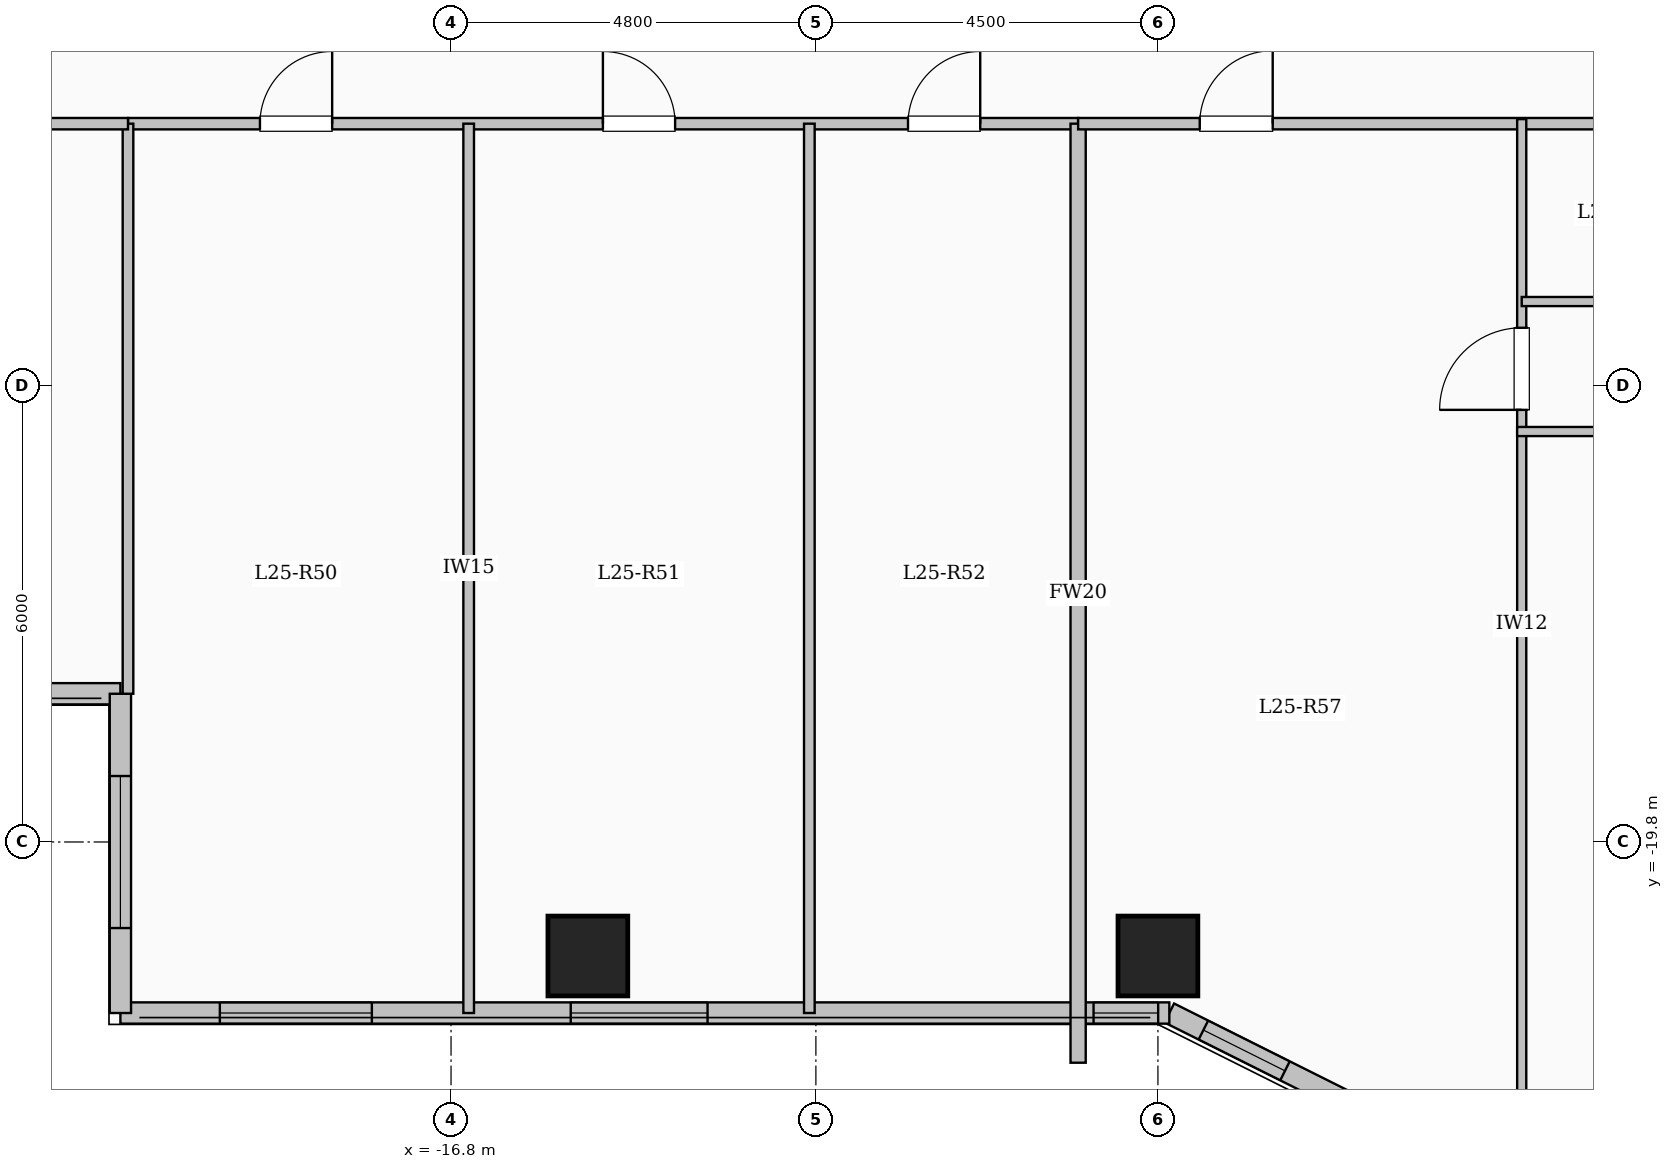
"""IFC4 building model, lengths in metres.
Left out: names, types, materials, properties, quantities, classifications, styles, units other than length and angle.
Written with IfcOpenShell. Run it as: python <this file> out.ifc"""

import sys

from ifc_helpers import new_model, si_unit, direction, frame, frame_2d, origin, origin_2d, place, context, subcontext, project, spatial, rectangle, extrude, element, fill, save


model = new_model("IFC4")
c1 = context("Model", 3, precision=1e-05, world=origin(), true_north=direction((0.0, 1.0)))
c2 = subcontext(c1, "Body", "Model", "MODEL_VIEW")
j1 = project(units=[si_unit("LENGTHUNIT", "METRE"), si_unit("PLANEANGLEUNIT", "RADIAN")], contexts=[c1])
p1 = place(None, origin())
s1 = spatial("IfcSite", under=j1, at=p1, CompositionType="ELEMENT")
p2 = place(p1, origin())
s2 = spatial("IfcBuilding", under=s1, at=p2, CompositionType="ELEMENT")
p3 = place(p2, frame((0.0, 0.0, 95.05)))
s3 = spatial("IfcBuildingStorey", under=s2, at=p3, CompositionType="ELEMENT", Elevation=95.05)
for number, where, z_axis, x_axis in (
    (1, (-15.0, -21.3, 0.0), (0.0, 0.0, 1.0), (1.0, 0.0, 0.0)),
    (2, (-7.5, -21.3, 0.0), (0.0, 0.0, 1.0), (1.0, 0.0, 0.0)),
):
    element("IfcColumn", number, at=place(p3, frame(where, z_axis=z_axis, x_axis=x_axis)), inside=s3, PredefinedType="COLUMN", context=c2, shape_type="SweptSolid", body=[
        extrude(rectangle(XDim=1.05, YDim=1.05, at=origin_2d()), origin(), (0.0, 0.0, 1.0), 3.35),
    ])
p4 = place(p3, frame((-21.15, -17.85, 0.0), z_axis=(0.0, 0.0, 1.0), x_axis=(-1.0, 0.0, 0.0)))
e3 = element("IfcWall", 3, at=p4, inside=s3, PredefinedType="SOLIDWALL", context=c2, shape_type="SweptSolid", body=[
    extrude(rectangle(XDim=5.7, YDim=0.28, at=frame_2d((2.85, 0.0))), origin(), (0.0, 0.0, 1.0), 3.1),
])
p5 = place(p4, frame((1.625, 0.0, 0.9)))
e4 = element("IfcOpeningElement", 4, at=p5, cuts=e3, PredefinedType="OPENING", context=c2, shape_type="SweptSolid", body=[
    extrude(rectangle(XDim=2.4, YDim=1.8, at=frame_2d((1.2, 0.9))), frame((0.0, 0.15, 0.0), z_axis=(0.0, -1.0, 0.0), x_axis=(1.0, 0.0, 0.0)), (0.0, 0.0, 1.0), 0.3),
])
p6 = place(p3, frame((-4.35, -23.55, 0.0), z_axis=(0.0, 0.0, 1.0), x_axis=(-0.894427191, 0.4472135955, 0.0)))
e5 = element("IfcWall", 5, at=p6, inside=s3, PredefinedType="SOLIDWALL", context=c2, shape_type="SweptSolid", body=[
    extrude(rectangle(XDim=3.354, YDim=0.28, at=frame_2d((1.677, 0.0))), origin(), (0.0, 0.0, 1.0), 3.1),
])
p7 = place(p6, frame((1.653, 0.0, 0.95)))
e6 = element("IfcOpeningElement", 6, at=p7, cuts=e5, PredefinedType="OPENING", context=c2, shape_type="SweptSolid", body=[
    extrude(rectangle(XDim=1.2, YDim=1.5, at=frame_2d((0.6, 0.75))), frame((0.0, 0.15, 0.0), z_axis=(0.0, -1.0, 0.0), x_axis=(1.0, 0.0, 0.0)), (0.0, 0.0, 1.0), 0.3),
])
p8 = place(p3, frame((-7.35, -22.05, 0.0), z_axis=(0.0, 0.0, 1.0), x_axis=(-1.0, 0.0, 0.0)))
e7 = element("IfcWall", 7, at=p8, inside=s3, PredefinedType="SOLIDWALL", context=c2, shape_type="SweptSolid", body=[
    extrude(rectangle(XDim=13.8, YDim=0.28, at=frame_2d((6.9, 0.0))), origin(), (0.0, 0.0, 1.0), 3.1),
])
p9 = place(p8, frame((0.147, 0.0, 0.95)))
e8 = element("IfcOpeningElement", 8, at=p9, cuts=e7, PredefinedType="OPENING", context=c2, shape_type="SweptSolid", body=[
    extrude(rectangle(XDim=0.85, YDim=1.5, at=frame_2d((0.425, 0.75))), frame((0.0, 0.15, 0.0), z_axis=(0.0, -1.0, 0.0), x_axis=(1.0, 0.0, 0.0)), (0.0, 0.0, 1.0), 0.3),
])
p10 = place(p8, frame((6.075, 0.0, 0.9)))
e9 = element("IfcOpeningElement", 9, at=p10, cuts=e7, PredefinedType="OPENING", context=c2, shape_type="SweptSolid", body=[
    extrude(rectangle(XDim=1.8, YDim=1.65, at=frame_2d((0.9, 0.825))), frame((0.0, 0.15, 0.0), z_axis=(0.0, -1.0, 0.0), x_axis=(1.0, 0.0, 0.0)), (0.0, 0.0, 1.0), 0.3),
])
p11 = place(p8, frame((10.492, 0.0, 0.9)))
e10 = element("IfcOpeningElement", 10, at=p11, cuts=e7, PredefinedType="OPENING", context=c2, shape_type="SweptSolid", body=[
    extrude(rectangle(XDim=2.0, YDim=1.7, at=frame_2d((1.0, 0.85))), frame((0.0, 0.15, 0.0), z_axis=(0.0, -1.0, 0.0), x_axis=(1.0, 0.0, 0.0)), (0.0, 0.0, 1.0), 0.3),
])
p12 = place(p3, frame((-21.15, -22.05, 0.0), z_axis=(0.0, 0.0, 1.0), x_axis=(0.0, 1.0, 0.0)))
e11 = element("IfcWall", 11, at=p12, inside=s3, PredefinedType="SOLIDWALL", context=c2, shape_type="SweptSolid", body=[
    extrude(rectangle(XDim=4.2, YDim=0.28, at=frame_2d((2.1, 0.0))), origin(), (0.0, 0.0, 1.0), 3.1),
])
p13 = place(p12, frame((1.118, 0.0, 0.9)))
e12 = element("IfcOpeningElement", 12, at=p13, cuts=e11, PredefinedType="OPENING", context=c2, shape_type="SweptSolid", body=[
    extrude(rectangle(XDim=2.0, YDim=1.7, at=frame_2d((1.0, 0.85))), frame((0.0, 0.15, 0.0), z_axis=(0.0, -1.0, 0.0), x_axis=(1.0, 0.0, 0.0)), (0.0, 0.0, 1.0), 0.3),
])
p14 = place(p3, frame((-21.05, -10.35, 0.0), z_axis=(0.0, 0.0, 1.0), x_axis=(1.0, 0.0, 0.0)))
e13 = element("IfcWall", 13, at=p14, inside=s3, PredefinedType="PARTITIONING", context=c2, shape_type="SweptSolid", body=[
    extrude(rectangle(XDim=12.5, YDim=0.15, at=frame_2d((6.25, 0.0))), origin(), (0.0, 0.0, 1.0), 3.1),
])
p15 = place(p14, frame((1.736, 0.0, 0.0)))
e14 = element("IfcOpeningElement", 14, at=p15, cuts=e13, PredefinedType="OPENING", context=c2, shape_type="SweptSolid", body=[
    extrude(rectangle(XDim=0.95, YDim=2.15, at=frame_2d((0.475, 1.075))), frame((0.0, 0.085, 0.0), z_axis=(0.0, -1.0, 0.0), x_axis=(1.0, 0.0, 0.0)), (0.0, 0.0, 1.0), 0.17),
])
p16 = place(p14, frame((6.248, 0.0, 0.0)))
e15 = element("IfcOpeningElement", 15, at=p16, cuts=e13, PredefinedType="OPENING", context=c2, shape_type="SweptSolid", body=[
    extrude(rectangle(XDim=0.95, YDim=2.15, at=frame_2d((0.475, 1.075))), frame((0.0, 0.085, 0.0), z_axis=(0.0, -1.0, 0.0), x_axis=(1.0, 0.0, 0.0)), (0.0, 0.0, 1.0), 0.17),
])
p17 = place(p14, frame((10.262, 0.0, 0.0)))
e16 = element("IfcOpeningElement", 16, at=p17, cuts=e13, PredefinedType="OPENING", context=c2, shape_type="SweptSolid", body=[
    extrude(rectangle(XDim=0.95, YDim=2.15, at=frame_2d((0.475, 1.075))), frame((0.0, 0.085, 0.0), z_axis=(0.0, -1.0, 0.0), x_axis=(1.0, 0.0, 0.0)), (0.0, 0.0, 1.0), 0.17),
])
for number, where, z_axis, x_axis in (
    (17, (-16.568, -22.05, 0.0), (0.0, 0.0, 1.0), (0.0, 1.0, 0.0)),
    (18, (-12.086, -22.05, 0.0), (0.0, 0.0, 1.0), (0.0, 1.0, 0.0)),
):
    element("IfcWall", number, at=place(p3, frame(where, z_axis=z_axis, x_axis=x_axis)), inside=s3, PredefinedType="PARTITIONING", context=c2, shape_type="SweptSolid", body=[
        extrude(rectangle(XDim=11.7, YDim=0.14, at=frame_2d((5.85, 0.0))), origin(), (0.0, 0.0, 1.0), 3.1),
    ])
p18 = place(p3, frame((-8.55, -22.704, 0.0), z_axis=(0.0, 0.0, 1.0), x_axis=(0.0, 1.0, 0.0)))
e19 = element("IfcWall", 19, at=p18, inside=s3, PredefinedType="SOLIDWALL", context=c2, shape_type="SweptSolid", body=[
    extrude(rectangle(XDim=12.354, YDim=0.2, at=frame_2d((6.177, 0.0))), origin(), (0.0, 0.0, 1.0), 3.1),
])
p19 = place(p3, frame((-8.55, -10.35, 0.0), z_axis=(0.0, 0.0, 1.0), x_axis=(1.0, 0.0, 0.0)))
e20 = element("IfcWall", 20, at=p19, inside=s3, PredefinedType="PARTITIONING", context=c2, shape_type="SweptSolid", body=[
    extrude(rectangle(XDim=17.1, YDim=0.15, at=frame_2d((8.55, 0.0))), origin(), (0.0, 0.0, 1.0), 3.1),
])
p20 = place(p19, frame((1.6, 0.0, 0.0)))
e21 = element("IfcOpeningElement", 21, at=p20, cuts=e20, PredefinedType="OPENING", context=c2, shape_type="SweptSolid", body=[
    extrude(rectangle(XDim=0.96, YDim=2.15, at=frame_2d((0.48, 1.075))), frame((0.0, 0.085, 0.0), z_axis=(0.0, -1.0, 0.0), x_axis=(1.0, 0.0, 0.0)), (0.0, 0.0, 1.0), 0.17),
])
p21 = place(p3, frame((-2.714, -23.58, 0.0), z_axis=(0.0, 0.0, 1.0), x_axis=(0.0, 1.0, 0.0)))
e22 = element("IfcWall", 22, at=p21, inside=s3, PredefinedType="PARTITIONING", context=c2, shape_type="SweptSolid", body=[
    extrude(rectangle(XDim=13.29, YDim=0.12, at=frame_2d((6.645, 0.0))), origin(), (0.0, 0.0, 1.0), 3.1),
])
p22 = place(p21, frame((9.465, 0.0, 0.0)))
e23 = element("IfcOpeningElement", 23, at=p22, cuts=e22, PredefinedType="OPENING", context=c2, shape_type="SweptSolid", body=[
    extrude(rectangle(XDim=1.08, YDim=2.15, at=frame_2d((0.54, 1.075))), frame((0.0, 0.07, 0.0), z_axis=(0.0, -1.0, 0.0), x_axis=(1.0, 0.0, 0.0)), (0.0, 0.0, 1.0), 0.14),
])
p23 = place(p3, frame((-2.714, -12.69, 0.0), z_axis=(0.0, 0.0, 1.0), x_axis=(1.0, 0.0, 0.0)))
e24 = element("IfcWall", 24, at=p23, inside=s3, PredefinedType="PARTITIONING", context=c2, shape_type="SweptSolid", body=[
    extrude(rectangle(XDim=5.933, YDim=0.12, at=frame_2d((2.967, 0.0))), origin(), (0.0, 0.0, 1.0), 2.635),
])
p24 = place(p23, frame((2.526, 0.0, 0.0)))
e25 = element("IfcOpeningElement", 25, at=p24, cuts=e24, PredefinedType="OPENING", context=c2, shape_type="SweptSolid", body=[
    extrude(rectangle(XDim=0.88, YDim=2.1, at=frame_2d((0.44, 1.05))), frame((0.0, 0.07, 0.0), z_axis=(0.0, -1.0, 0.0), x_axis=(1.0, 0.0, 0.0)), (0.0, 0.0, 1.0), 0.14),
])
p25 = place(p3, frame((-2.774, -14.4, 0.0), z_axis=(0.0, 0.0, 1.0), x_axis=(1.0, 0.0, 0.0)))
e26 = element("IfcWall", 26, at=p25, inside=s3, PredefinedType="PARTITIONING", context=c2, shape_type="SweptSolid", body=[
    extrude(rectangle(XDim=11.384, YDim=0.12, at=frame_2d((5.692, 0.0))), origin(), (0.0, 0.0, 1.0), 2.635),
])
p26 = place(p25, frame((1.426, 0.0, 0.0)))
e27 = element("IfcOpeningElement", 27, at=p26, cuts=e26, PredefinedType="OPENING", context=c2, shape_type="SweptSolid", body=[
    extrude(rectangle(XDim=0.88, YDim=2.1, at=frame_2d((0.44, 1.05))), frame((0.0, 0.07, 0.0), z_axis=(0.0, -1.0, 0.0), x_axis=(1.0, 0.0, 0.0)), (0.0, 0.0, 1.0), 0.14),
])
p27 = place(p25, frame((5.157, 0.0, 0.0)))
e28 = element("IfcOpeningElement", 28, at=p27, cuts=e26, PredefinedType="OPENING", context=c2, shape_type="SweptSolid", body=[
    extrude(rectangle(XDim=0.88, YDim=2.1, at=frame_2d((0.44, 1.05))), frame((0.0, 0.07, 0.0), z_axis=(0.0, -1.0, 0.0), x_axis=(1.0, 0.0, 0.0)), (0.0, 0.0, 1.0), 0.14),
])
p28 = place(p25, frame((8.888, 0.0, 0.0)))
e29 = element("IfcOpeningElement", 29, at=p28, cuts=e26, PredefinedType="OPENING", context=c2, shape_type="SweptSolid", body=[
    extrude(rectangle(XDim=0.88, YDim=2.1, at=frame_2d((0.44, 1.05))), frame((0.0, 0.07, 0.0), z_axis=(0.0, -1.0, 0.0), x_axis=(1.0, 0.0, 0.0)), (0.0, 0.0, 1.0), 0.14),
])
p29 = place(p3, frame((-21.05, -17.85, 0.0), z_axis=(0.0, 0.0, 1.0), x_axis=(0.0, 1.0, 0.0)))
e30 = element("IfcWall", 30, at=p29, inside=s3, PredefinedType="PARTITIONING", context=c2, shape_type="SweptSolid", body=[
    extrude(rectangle(XDim=7.5, YDim=0.14, at=frame_2d((3.75, 0.0))), origin(), (0.0, 0.0, 1.0), 3.1),
])
p30 = place(p3, frame((-26.88, -10.35, 0.0), z_axis=(0.0, 0.0, 1.0), x_axis=(1.0, 0.0, 0.0)))
e31 = element("IfcWall", 31, at=p30, inside=s3, PredefinedType="PARTITIONING", context=c2, shape_type="SweptSolid", body=[
    extrude(rectangle(XDim=5.83, YDim=0.15, at=frame_2d((2.915, 0.0))), origin(), (0.0, 0.0, 1.0), 3.1),
])
p31 = place(p30, frame((2.44, 0.0, 0.0)))
e32 = element("IfcOpeningElement", 32, at=p31, cuts=e31, PredefinedType="OPENING", context=c2, shape_type="SweptSolid", body=[
    extrude(rectangle(XDim=0.95, YDim=2.15, at=frame_2d((0.475, 1.075))), frame((0.0, 0.085, 0.0), z_axis=(0.0, -1.0, 0.0), x_axis=(1.0, 0.0, 0.0)), (0.0, 0.0, 1.0), 0.17),
])
p32 = place(p7, origin())
e33 = element("IfcWindow", 33, at=p32, inside=s3, PartitioningType="SINGLE_PANEL", PredefinedType="WINDOW", context=c2, shape_type="SweptSolid", body=[
    extrude(rectangle(XDim=1.2, YDim=1.5, at=frame_2d((0.6, 0.75))), frame((0.0, 0.03, 0.0), z_axis=(0.0, -1.0, 0.0), x_axis=(1.0, 0.0, 0.0)), (0.0, 0.0, 1.0), 0.06),
])
fill(e6, e33)
p33 = place(p9, origin())
e34 = element("IfcWindow", 34, at=p33, inside=s3, PartitioningType="SINGLE_PANEL", PredefinedType="WINDOW", context=c2, shape_type="SweptSolid", body=[
    extrude(rectangle(XDim=0.85, YDim=1.5, at=frame_2d((0.425, 0.75))), frame((0.0, 0.03, 0.0), z_axis=(0.0, -1.0, 0.0), x_axis=(1.0, 0.0, 0.0)), (0.0, 0.0, 1.0), 0.06),
])
fill(e8, e34)
p34 = place(p10, origin())
e35 = element("IfcWindow", 35, at=p34, inside=s3, PartitioningType="SINGLE_PANEL", PredefinedType="WINDOW", context=c2, shape_type="SweptSolid", body=[
    extrude(rectangle(XDim=1.8, YDim=1.65, at=frame_2d((0.9, 0.825))), frame((0.0, 0.03, 0.0), z_axis=(0.0, -1.0, 0.0), x_axis=(1.0, 0.0, 0.0)), (0.0, 0.0, 1.0), 0.06),
])
fill(e9, e35)
p35 = place(p11, origin())
e36 = element("IfcWindow", 36, at=p35, inside=s3, PartitioningType="SINGLE_PANEL", PredefinedType="WINDOW", context=c2, shape_type="SweptSolid", body=[
    extrude(rectangle(XDim=2.0, YDim=1.7, at=frame_2d((1.0, 0.85))), frame((0.0, 0.03, 0.0), z_axis=(0.0, -1.0, 0.0), x_axis=(1.0, 0.0, 0.0)), (0.0, 0.0, 1.0), 0.06),
])
fill(e10, e36)
p36 = place(p13, origin())
e37 = element("IfcWindow", 37, at=p36, inside=s3, PartitioningType="SINGLE_PANEL", PredefinedType="WINDOW", context=c2, shape_type="SweptSolid", body=[
    extrude(rectangle(XDim=2.0, YDim=1.7, at=frame_2d((1.0, 0.85))), frame((0.0, 0.03, 0.0), z_axis=(0.0, -1.0, 0.0), x_axis=(1.0, 0.0, 0.0)), (0.0, 0.0, 1.0), 0.06),
])
fill(e12, e37)
p37 = place(p15, origin())
e38 = element("IfcDoor", 38, at=p37, inside=s3, OperationType="SINGLE_SWING_RIGHT", PredefinedType="DOOR", context=c2, shape_type="SweptSolid", body=[
    extrude(rectangle(XDim=0.95, YDim=2.15, at=frame_2d((0.475, 1.075))), frame((0.0, 0.025, 0.0), z_axis=(0.0, -1.0, 0.0), x_axis=(1.0, 0.0, 0.0)), (0.0, 0.0, 1.0), 0.05),
])
fill(e14, e38)
p38 = place(p16, origin())
e39 = element("IfcDoor", 39, at=p38, inside=s3, OperationType="SINGLE_SWING_LEFT", PredefinedType="DOOR", context=c2, shape_type="SweptSolid", body=[
    extrude(rectangle(XDim=0.95, YDim=2.15, at=frame_2d((0.475, 1.075))), frame((0.0, 0.025, 0.0), z_axis=(0.0, -1.0, 0.0), x_axis=(1.0, 0.0, 0.0)), (0.0, 0.0, 1.0), 0.05),
])
fill(e15, e39)
p39 = place(p17, origin())
e40 = element("IfcDoor", 40, at=p39, inside=s3, OperationType="SINGLE_SWING_RIGHT", PredefinedType="DOOR", context=c2, shape_type="SweptSolid", body=[
    extrude(rectangle(XDim=0.95, YDim=2.15, at=frame_2d((0.475, 1.075))), frame((0.0, 0.025, 0.0), z_axis=(0.0, -1.0, 0.0), x_axis=(1.0, 0.0, 0.0)), (0.0, 0.0, 1.0), 0.05),
])
fill(e16, e40)
p40 = place(p20, origin())
e41 = element("IfcDoor", 41, at=p40, inside=s3, OperationType="SINGLE_SWING_RIGHT", PredefinedType="DOOR", context=c2, shape_type="SweptSolid", body=[
    extrude(rectangle(XDim=0.96, YDim=2.15, at=frame_2d((0.48, 1.075))), frame((0.0, 0.025, 0.0), z_axis=(0.0, -1.0, 0.0), x_axis=(1.0, 0.0, 0.0)), (0.0, 0.0, 1.0), 0.05),
])
fill(e21, e41)
p41 = place(p22, origin())
e42 = element("IfcDoor", 42, at=p41, inside=s3, OperationType="SINGLE_SWING_LEFT", PredefinedType="DOOR", context=c2, shape_type="SweptSolid", body=[
    extrude(rectangle(XDim=1.08, YDim=2.15, at=frame_2d((0.54, 1.075))), frame((0.0, 0.025, 0.0), z_axis=(0.0, -1.0, 0.0), x_axis=(1.0, 0.0, 0.0)), (0.0, 0.0, 1.0), 0.05),
])
fill(e23, e42)
save(model, sys.argv[1])
